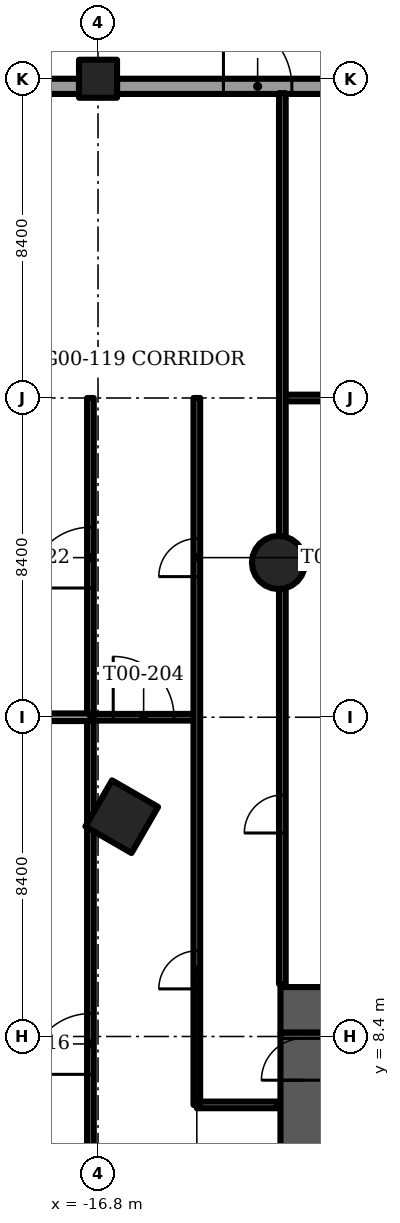
"""IFC4 building model, lengths in metres.
Left out: names, types, materials, properties, quantities, classifications, styles, units other than length and angle.
Written with IfcOpenShell. Run it as: python <this file> out.ifc"""

import sys

from ifc_helpers import new_model, si_unit, direction, frame, frame_2d, origin, origin_2d, place, context, subcontext, project, spatial, rectangle, circle, extrude, element, fill, save


model = new_model("IFC4")
c1 = context("Model", 3, precision=1e-05, world=origin(), true_north=direction((0.0, 1.0)))
c2 = subcontext(c1, "Body", "Model", "MODEL_VIEW")
j1 = project(units=[si_unit("LENGTHUNIT", "METRE"), si_unit("PLANEANGLEUNIT", "RADIAN")], contexts=[c1])
p1 = place(None, origin())
s1 = spatial("IfcSite", under=j1, at=p1, CompositionType="ELEMENT")
p2 = place(p1, origin())
s2 = spatial("IfcBuilding", under=s1, at=p2, CompositionType="ELEMENT")
p3 = place(p2, origin())
s3 = spatial("IfcBuildingStorey", under=s2, at=p3, CompositionType="ELEMENT", Elevation=0.0)
p4 = place(p3, frame((-16.8, 33.6, -0.35), z_axis=(0.0, 0.0, 1.0), x_axis=(1.0, 0.0, 0.0)))
e1 = element("IfcColumn", 1, at=p4, inside=s3, PredefinedType="COLUMN", context=c2, shape_type="SweptSolid", body=[
    extrude(rectangle(XDim=1.0, YDim=1.0, at=origin_2d()), origin(), (0.0, 0.0, 1.0), 6.0),
])
p5 = place(p3, frame((-12.051, 20.872, -0.35), z_axis=(0.0, 0.0, 1.0), x_axis=(1.0, 0.0, 0.0)))
e2 = element("IfcColumn", 2, at=p5, inside=s3, PredefinedType="COLUMN", context=c2, shape_type="SweptSolid", body=[
    extrude(circle(Radius=0.7, at=origin_2d()), origin(), (0.0, 0.0, 1.0), 5.15),
])
p6 = place(p3, frame((-16.175, 14.183, -0.35), z_axis=(0.0, 0.0, 1.0), x_axis=(0.5, 0.866025403784, 0.0)))
e3 = element("IfcColumn", 3, at=p6, inside=s3, PredefinedType="COLUMN", context=c2, shape_type="SweptSolid", body=[
    extrude(rectangle(XDim=1.4, YDim=1.4, at=origin_2d()), origin(), (0.0, 0.0, 1.0), 5.15),
])
p7 = place(p3, frame((-12.0, 9.1, -0.35), z_axis=(0.0, 0.0, 1.0), x_axis=(1.0, 0.0, 0.0)))
e4 = element("IfcWall", 4, at=p7, inside=s3, PredefinedType="SHEAR", context=c2, shape_type="SweptSolid", body=[
    extrude(rectangle(XDim=24.0, YDim=1.2, at=frame_2d((12.0, 0.0))), origin(), (0.0, 0.0, 1.0), 6.0),
])
p8 = place(p7, frame((11.2, 0.0, 0.0)))
e5 = element("IfcOpeningElement", 5, at=p8, cuts=e4, PredefinedType="OPENING", context=c2, shape_type="SweptSolid", body=[
    extrude(rectangle(XDim=1.6, YDim=2.1, at=frame_2d((0.8, 1.05))), frame((0.0, 0.6, 0.0), z_axis=(0.0, -1.0, 0.0), x_axis=(1.0, 0.0, 0.0)), (0.0, 0.0, 1.0), 1.2),
])
p9 = place(p7, frame((5.25, 0.0, 0.0)))
e6 = element("IfcOpeningElement", 6, at=p9, cuts=e4, PredefinedType="OPENING", context=c2, shape_type="SweptSolid", body=[
    extrude(rectangle(XDim=1.1, YDim=2.1, at=frame_2d((0.55, 1.05))), frame((0.0, 0.6, 0.0), z_axis=(0.0, -1.0, 0.0), x_axis=(1.0, 0.0, 0.0)), (0.0, 0.0, 1.0), 1.2),
])
p10 = place(p7, frame((17.65, 0.0, 0.0)))
e7 = element("IfcOpeningElement", 7, at=p10, cuts=e4, PredefinedType="OPENING", context=c2, shape_type="SweptSolid", body=[
    extrude(rectangle(XDim=1.1, YDim=2.1, at=frame_2d((0.55, 1.05))), frame((0.0, 0.6, 0.0), z_axis=(0.0, -1.0, 0.0), x_axis=(1.0, 0.0, 0.0)), (0.0, 0.0, 1.0), 1.2),
])
p11 = place(p3, frame((-11.4, -0.5, -0.35), z_axis=(0.0, 0.0, 1.0), x_axis=(0.0, 1.0, 0.0)))
e8 = element("IfcWall", 8, at=p11, inside=s3, PredefinedType="SHEAR", context=c2, shape_type="SweptSolid", body=[
    extrude(rectangle(XDim=9.0, YDim=1.2, at=frame_2d((4.5, 0.0))), origin(), (0.0, 0.0, 1.0), 6.0),
])
p12 = place(p11, frame((7.75, 0.0, 0.0)))
e9 = element("IfcOpeningElement", 9, at=p12, cuts=e8, PredefinedType="OPENING", context=c2, shape_type="SweptSolid", body=[
    extrude(rectangle(XDim=1.1, YDim=2.1, at=frame_2d((0.55, 1.05))), frame((0.0, 0.6, 0.0), z_axis=(0.0, -1.0, 0.0), x_axis=(1.0, 0.0, 0.0)), (0.0, 0.0, 1.0), 1.2),
])
p13 = place(p11, frame((0.55, 0.0, 0.0)))
e10 = element("IfcOpeningElement", 10, at=p13, cuts=e8, PredefinedType="OPENING", context=c2, shape_type="SweptSolid", body=[
    extrude(rectangle(XDim=1.2, YDim=2.1, at=frame_2d((0.6, 1.05))), frame((0.0, 0.6, 0.0), z_axis=(0.0, -1.0, 0.0), x_axis=(1.0, 0.0, 0.0)), (0.0, 0.0, 1.0), 1.2),
])
p14 = place(p11, frame((3.0, 0.0, 0.0)))
e11 = element("IfcOpeningElement", 11, at=p14, cuts=e8, PredefinedType="OPENING", context=c2, shape_type="SweptSolid", body=[
    extrude(rectangle(XDim=1.2, YDim=2.1, at=frame_2d((0.6, 1.05))), frame((0.0, 0.6, 0.0), z_axis=(0.0, -1.0, 0.0), x_axis=(1.0, 0.0, 0.0)), (0.0, 0.0, 1.0), 1.2),
])
p15 = place(p3, frame((-24.7, 33.4, 0.0), z_axis=(0.0, 0.0, 1.0), x_axis=(1.0, 0.0, 0.0)))
e12 = element("IfcWall", 12, at=p15, inside=s3, PredefinedType="SOLIDWALL", context=c2, shape_type="SweptSolid", body=[
    extrude(rectangle(XDim=7.4, YDim=0.4, at=frame_2d((3.7, 0.0))), origin(), (0.0, 0.0, 1.0), 5.65),
])
p16 = place(p15, frame((2.2, 0.0, 1.0)))
e13 = element("IfcOpeningElement", 13, at=p16, cuts=e12, PredefinedType="OPENING", context=c2, shape_type="SweptSolid", body=[
    extrude(rectangle(XDim=3.0, YDim=2.2, at=frame_2d((1.5, 1.1))), frame((0.0, 0.2, 0.0), z_axis=(0.0, -1.0, 0.0), x_axis=(1.0, 0.0, 0.0)), (0.0, 0.0, 1.0), 0.4),
])
p17 = place(p3, frame((-16.3, 33.4, 0.0), z_axis=(0.0, 0.0, 1.0), x_axis=(1.0, 0.0, 0.0)))
e14 = element("IfcWall", 14, at=p17, inside=s3, PredefinedType="SOLIDWALL", context=c2, shape_type="SweptSolid", body=[
    extrude(rectangle(XDim=7.4, YDim=0.4, at=frame_2d((3.7, 0.0))), origin(), (0.0, 0.0, 1.0), 5.65),
])
p18 = place(p17, frame((2.8, 0.0, 0.0)))
e15 = element("IfcOpeningElement", 15, at=p18, cuts=e14, PredefinedType="OPENING", context=c2, shape_type="SweptSolid", body=[
    extrude(rectangle(XDim=1.8, YDim=2.4, at=frame_2d((0.9, 1.2))), frame((0.0, 0.2, 0.0), z_axis=(0.0, -1.0, 0.0), x_axis=(1.0, 0.0, 0.0)), (0.0, 0.0, 1.0), 0.4),
])
p19 = place(p3, frame((-14.2, 6.6, 0.0), z_axis=(0.0, 0.0, 1.0), x_axis=(1.0, 0.0, 0.0)))
e16 = element("IfcWall", 16, at=p19, inside=s3, PredefinedType="PARTITIONING", context=c2, shape_type="SweptSolid", body=[
    extrude(rectangle(XDim=2.12, YDim=0.175, at=frame_2d((1.06, 0.0))), origin(), (0.0, 0.0, 1.0), 5.65),
])
p20 = place(p3, frame((-17.0, 16.8, 0.0), z_axis=(0.0, 0.0, 1.0), x_axis=(1.0, 0.0, 0.0)))
e17 = element("IfcWall", 17, at=p20, inside=s3, PredefinedType="PARTITIONING", context=c2, shape_type="SweptSolid", body=[
    extrude(rectangle(XDim=2.8, YDim=0.175, at=frame_2d((1.4, 0.0))), origin(), (0.0, 0.0, 1.0), 4.8),
])
p21 = place(p20, frame((0.6, 0.0, 0.0)))
e18 = element("IfcOpeningElement", 18, at=p21, cuts=e17, PredefinedType="OPENING", context=c2, shape_type="SweptSolid", body=[
    extrude(rectangle(XDim=1.6, YDim=2.1, at=frame_2d((0.8, 1.05))), frame((0.0, 0.087, 0.0), z_axis=(0.0, -1.0, 0.0), x_axis=(1.0, 0.0, 0.0)), (0.0, 0.0, 1.0), 0.175),
])
p22 = place(p3, frame((-11.95, 25.2, 0.0), z_axis=(0.0, 0.0, 1.0), x_axis=(1.0, 0.0, 0.0)))
e19 = element("IfcWall", 19, at=p22, inside=s3, PredefinedType="PARTITIONING", context=c2, shape_type="SweptSolid", body=[
    extrude(rectangle(XDim=20.35, YDim=0.175, at=frame_2d((10.175, 0.0))), origin(), (0.0, 0.0, 1.0), 5.65),
])
p23 = place(p22, frame((4.475, 0.0, 0.0)))
e20 = element("IfcOpeningElement", 20, at=p23, cuts=e19, PredefinedType="OPENING", context=c2, shape_type="SweptSolid", body=[
    extrude(rectangle(XDim=1.0, YDim=2.1, at=frame_2d((0.5, 1.05))), frame((0.0, 0.087, 0.0), z_axis=(0.0, -1.0, 0.0), x_axis=(1.0, 0.0, 0.0)), (0.0, 0.0, 1.0), 0.175),
])
p24 = place(p22, frame((14.65, 0.0, 0.0)))
e21 = element("IfcOpeningElement", 21, at=p24, cuts=e19, PredefinedType="OPENING", context=c2, shape_type="SweptSolid", body=[
    extrude(rectangle(XDim=1.0, YDim=2.1, at=frame_2d((0.5, 1.05))), frame((0.0, 0.087, 0.0), z_axis=(0.0, -1.0, 0.0), x_axis=(1.0, 0.0, 0.0)), (0.0, 0.0, 1.0), 0.175),
])
p25 = place(p3, frame((-17.0, -21.0, 0.0), z_axis=(0.0, 0.0, 1.0), x_axis=(0.0, 1.0, 0.0)))
e22 = element("IfcWall", 22, at=p25, inside=s3, PredefinedType="PARTITIONING", context=c2, shape_type="SweptSolid", body=[
    extrude(rectangle(XDim=46.2, YDim=0.175, at=frame_2d((23.1, 0.0))), origin(), (0.0, 0.0, 1.0), 4.8),
])
p26 = place(p25, frame((15.996, 0.0, 0.0)))
e23 = element("IfcOpeningElement", 23, at=p26, cuts=e22, PredefinedType="OPENING", context=c2, shape_type="SweptSolid", body=[
    extrude(rectangle(XDim=1.6, YDim=2.1, at=frame_2d((0.8, 1.05))), frame((0.0, 0.087, 0.0), z_axis=(0.0, -1.0, 0.0), x_axis=(1.0, 0.0, 0.0)), (0.0, 0.0, 1.0), 0.175),
])
p27 = place(p25, frame((28.404, 0.0, 0.0)))
e24 = element("IfcOpeningElement", 24, at=p27, cuts=e22, PredefinedType="OPENING", context=c2, shape_type="SweptSolid", body=[
    extrude(rectangle(XDim=1.6, YDim=2.1, at=frame_2d((0.8, 1.05))), frame((0.0, 0.087, 0.0), z_axis=(0.0, -1.0, 0.0), x_axis=(1.0, 0.0, 0.0)), (0.0, 0.0, 1.0), 0.175),
])
p28 = place(p25, frame((41.2, 0.0, 0.0)))
e25 = element("IfcOpeningElement", 25, at=p28, cuts=e22, PredefinedType="OPENING", context=c2, shape_type="SweptSolid", body=[
    extrude(rectangle(XDim=1.6, YDim=2.1, at=frame_2d((0.8, 1.05))), frame((0.0, 0.087, 0.0), z_axis=(0.0, -1.0, 0.0), x_axis=(1.0, 0.0, 0.0)), (0.0, 0.0, 1.0), 0.175),
])
p29 = place(p3, frame((-14.2, 6.6, 0.0), z_axis=(0.0, 0.0, 1.0), x_axis=(0.0, 1.0, 0.0)))
e26 = element("IfcWall", 26, at=p29, inside=s3, PredefinedType="PARTITIONING", context=c2, shape_type="SweptSolid", body=[
    extrude(rectangle(XDim=18.6, YDim=0.175, at=frame_2d((9.3, 0.0))), origin(), (0.0, 0.0, 1.0), 4.8),
])
p30 = place(p29, frame((3.052, 0.0, 0.0)))
e27 = element("IfcOpeningElement", 27, at=p30, cuts=e26, PredefinedType="OPENING", context=c2, shape_type="SweptSolid", body=[
    extrude(rectangle(XDim=1.0, YDim=2.1, at=frame_2d((0.5, 1.05))), frame((0.0, 0.087, 0.0), z_axis=(0.0, -1.0, 0.0), x_axis=(1.0, 0.0, 0.0)), (0.0, 0.0, 1.0), 0.175),
])
p31 = place(p29, frame((13.9, 0.0, 0.0)))
e28 = element("IfcOpeningElement", 28, at=p31, cuts=e26, PredefinedType="OPENING", context=c2, shape_type="SweptSolid", body=[
    extrude(rectangle(XDim=1.0, YDim=2.1, at=frame_2d((0.5, 1.05))), frame((0.0, 0.087, 0.0), z_axis=(0.0, -1.0, 0.0), x_axis=(1.0, 0.0, 0.0)), (0.0, 0.0, 1.0), 0.175),
])
p32 = place(p3, frame((-11.95, 9.78, 0.0), z_axis=(0.0, 0.0, 1.0), x_axis=(0.0, 1.0, 0.0)))
e29 = element("IfcWall", 29, at=p32, inside=s3, PredefinedType="PARTITIONING", context=c2, shape_type="SweptSolid", body=[
    extrude(rectangle(XDim=10.402, YDim=0.175, at=frame_2d((5.201, 0.0))), origin(), (0.0, 0.0, 1.0), 5.65),
])
p33 = place(p32, frame((3.974, 0.0, 0.0)))
e30 = element("IfcOpeningElement", 30, at=p33, cuts=e29, PredefinedType="OPENING", context=c2, shape_type="SweptSolid", body=[
    extrude(rectangle(XDim=1.0, YDim=2.1, at=frame_2d((0.5, 1.05))), frame((0.0, 0.087, 0.0), z_axis=(0.0, -1.0, 0.0), x_axis=(1.0, 0.0, 0.0)), (0.0, 0.0, 1.0), 0.175),
])
p34 = place(p3, frame((-11.95, 21.562, 0.0), z_axis=(0.0, 0.0, 1.0), x_axis=(0.0, 1.0, 0.0)))
e31 = element("IfcWall", 31, at=p34, inside=s3, PredefinedType="PARTITIONING", context=c2, shape_type="SweptSolid", body=[
    extrude(rectangle(XDim=11.658, YDim=0.175, at=frame_2d((5.829, 0.0))), origin(), (0.0, 0.0, 1.0), 5.65),
])
p35 = place(p3, frame((-24.7, 16.8, 0.0), z_axis=(0.0, 0.0, 1.0), x_axis=(1.0, 0.0, 0.0)))
e32 = element("IfcWall", 32, at=p35, inside=s3, PredefinedType="PARTITIONING", context=c2, shape_type="SweptSolid", body=[
    extrude(rectangle(XDim=7.7, YDim=0.2, at=frame_2d((3.85, 0.0))), origin(), (0.0, 0.0, 1.0), 5.65),
])
p36 = place(p18, origin())
e33 = element("IfcDoor", 33, at=p36, inside=s3, OperationType="SINGLE_SWING_LEFT", PredefinedType="DOOR", context=c2, shape_type="SweptSolid", body=[
    extrude(rectangle(XDim=1.8, YDim=2.4, at=frame_2d((0.9, 1.2))), frame((0.0, 0.025, 0.0), z_axis=(0.0, -1.0, 0.0), x_axis=(1.0, 0.0, 0.0)), (0.0, 0.0, 1.0), 0.05),
])
fill(e15, e33)
p37 = place(p12, origin())
e34 = element("IfcDoor", 34, at=p37, inside=s3, OperationType="SINGLE_SWING_LEFT", PredefinedType="DOOR", context=c2, shape_type="SweptSolid", body=[
    extrude(rectangle(XDim=1.1, YDim=2.1, at=frame_2d((0.55, 1.05))), frame((0.0, 0.025, 0.0), z_axis=(0.0, -1.0, 0.0), x_axis=(1.0, 0.0, 0.0)), (0.0, 0.0, 1.0), 0.05),
])
fill(e9, e34)
p38 = place(p21, origin())
e35 = element("IfcDoor", 35, at=p38, inside=s3, OperationType="DOUBLE_DOOR_SINGLE_SWING", PredefinedType="DOOR", context=c2, shape_type="SweptSolid", body=[
    extrude(rectangle(XDim=1.6, YDim=2.1, at=frame_2d((0.8, 1.05))), frame((0.0, 0.025, 0.0), z_axis=(0.0, -1.0, 0.0), x_axis=(1.0, 0.0, 0.0)), (0.0, 0.0, 1.0), 0.05),
])
fill(e18, e35)
p39 = place(p30, origin())
e36 = element("IfcDoor", 36, at=p39, inside=s3, OperationType="SINGLE_SWING_RIGHT", PredefinedType="DOOR", context=c2, shape_type="SweptSolid", body=[
    extrude(rectangle(XDim=1.0, YDim=2.1, at=frame_2d((0.5, 1.05))), frame((0.0, 0.025, 0.0), z_axis=(0.0, -1.0, 0.0), x_axis=(1.0, 0.0, 0.0)), (0.0, 0.0, 1.0), 0.05),
])
fill(e27, e36)
p40 = place(p33, origin())
e37 = element("IfcDoor", 37, at=p40, inside=s3, OperationType="SINGLE_SWING_LEFT", PredefinedType="DOOR", context=c2, shape_type="SweptSolid", body=[
    extrude(rectangle(XDim=1.0, YDim=2.1, at=frame_2d((0.5, 1.05))), frame((0.0, 0.025, 0.0), z_axis=(0.0, -1.0, 0.0), x_axis=(1.0, 0.0, 0.0)), (0.0, 0.0, 1.0), 0.05),
])
fill(e30, e37)
p41 = place(p31, origin())
e38 = element("IfcDoor", 38, at=p41, inside=s3, OperationType="SINGLE_SWING_RIGHT", PredefinedType="DOOR", context=c2, shape_type="SweptSolid", body=[
    extrude(rectangle(XDim=1.0, YDim=2.1, at=frame_2d((0.5, 1.05))), frame((0.0, 0.025, 0.0), z_axis=(0.0, -1.0, 0.0), x_axis=(1.0, 0.0, 0.0)), (0.0, 0.0, 1.0), 0.05),
])
fill(e28, e38)
p42 = place(p27, origin())
e39 = element("IfcDoor", 39, at=p42, inside=s3, OperationType="DOUBLE_DOOR_SINGLE_SWING", PredefinedType="DOOR", context=c2, shape_type="SweptSolid", body=[
    extrude(rectangle(XDim=1.6, YDim=2.1, at=frame_2d((0.8, 1.05))), frame((0.0, 0.025, 0.0), z_axis=(0.0, -1.0, 0.0), x_axis=(1.0, 0.0, 0.0)), (0.0, 0.0, 1.0), 0.05),
])
fill(e24, e39)
p43 = place(p28, origin())
e40 = element("IfcDoor", 40, at=p43, inside=s3, OperationType="DOUBLE_DOOR_SINGLE_SWING", PredefinedType="DOOR", context=c2, shape_type="SweptSolid", body=[
    extrude(rectangle(XDim=1.6, YDim=2.1, at=frame_2d((0.8, 1.05))), frame((0.0, 0.025, 0.0), z_axis=(0.0, -1.0, 0.0), x_axis=(1.0, 0.0, 0.0)), (0.0, 0.0, 1.0), 0.05),
])
fill(e25, e40)
save(model, sys.argv[1])
